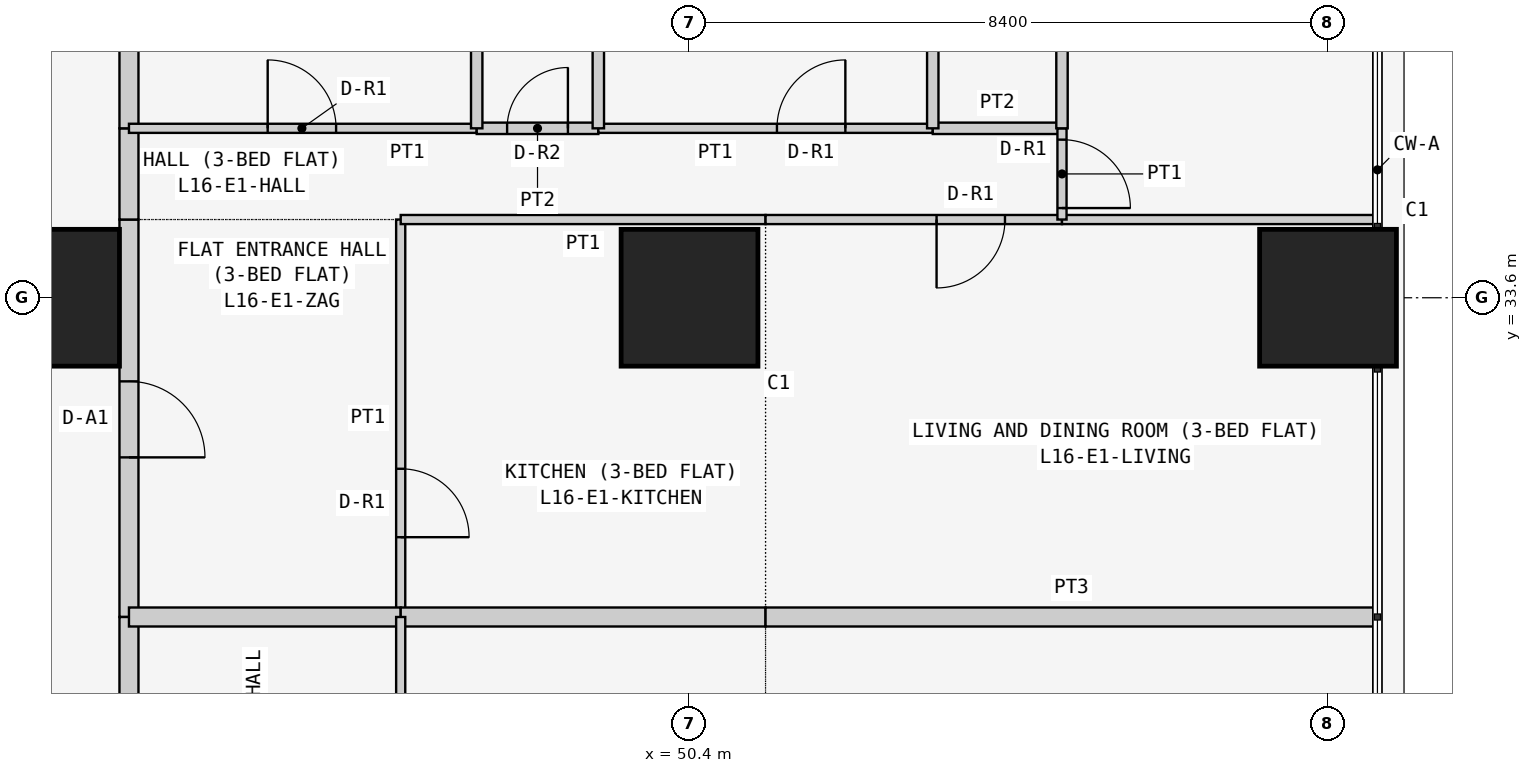
"""IFC4 building model, lengths in metres.
Left out: names, types, materials, properties, quantities, classifications, styles, units other than length and angle.
Written with IfcOpenShell. Run it as: python <this file> out.ifc"""

import sys

from ifc_helpers import new_model, si_unit, direction, frame, frame_2d, origin, origin_2d, place, context, subcontext, project, spatial, rectangle, extrude, element, fill, save


model = new_model("IFC4")
c1 = context("Model", 3, precision=1e-05, world=origin(), true_north=direction((0.0, 1.0)))
c2 = subcontext(c1, "Body", "Model", "MODEL_VIEW")
j1 = project(units=[si_unit("LENGTHUNIT", "METRE"), si_unit("PLANEANGLEUNIT", "RADIAN")], contexts=[c1])
p1 = place(None, origin())
s1 = spatial("IfcSite", under=j1, at=p1, CompositionType="ELEMENT")
p2 = place(p1, origin())
s2 = spatial("IfcBuilding", under=s1, at=p2, CompositionType="ELEMENT")
p3 = place(p2, frame((0.0, 0.0, 66.9)))
s3 = spatial("IfcBuildingStorey", under=s2, at=p3, CompositionType="ELEMENT", Elevation=66.9)
for number, where, z_axis, x_axis in (
    (1, (42.0, 33.6, 0.0), (0.0, 0.0, 1.0), (1.0, 0.0, 0.0)),
    (2, (50.4, 33.6, 0.0), (0.0, 0.0, 1.0), (1.0, 0.0, 0.0)),
    (3, (58.8, 33.6, 0.0), (0.0, 0.0, 1.0), (1.0, 0.0, 0.0)),
):
    element("IfcColumn", number, at=place(p3, frame(where, z_axis=z_axis, x_axis=x_axis)), inside=s3, PredefinedType="COLUMN", context=c2, shape_type="SweptSolid", body=[
        extrude(rectangle(XDim=1.8, YDim=1.8, at=origin_2d()), origin(), (0.0, 0.0, 1.0), 3.6),
    ])
p4 = place(p3, frame((43.025, 34.629, 0.0), z_axis=(0.0, 0.0, 1.0), x_axis=(0.0, -1.0, 0.0)))
e4 = element("IfcWall", 4, at=p4, inside=s3, PredefinedType="PARTITIONING", context=c2, shape_type="SweptSolid", body=[
    extrude(rectangle(XDim=5.229, YDim=0.25, at=frame_2d((2.615, 0.0))), origin(), (0.0, 0.0, 1.0), 3.45),
])
p5 = place(p4, frame((2.129, 0.0, 0.0)))
e5 = element("IfcOpeningElement", 5, at=p5, cuts=e4, PredefinedType="OPENING", context=c2, shape_type="SweptSolid", body=[
    extrude(rectangle(XDim=1.0, YDim=2.1, at=frame_2d((0.5, 1.05))), frame((0.0, 0.135, 0.0), z_axis=(0.0, -1.0, 0.0), x_axis=(1.0, 0.0, 0.0)), (0.0, 0.0, 1.0), 0.27),
])
p6 = place(p3, frame((43.025, 35.829, 0.0), z_axis=(0.0, 0.0, 1.0), x_axis=(0.0, -1.0, 0.0)))
e6 = element("IfcWall", 6, at=p6, inside=s3, PredefinedType="PARTITIONING", context=c2, shape_type="SweptSolid", body=[
    extrude(rectangle(XDim=1.2, YDim=0.25, at=frame_2d((0.6, 0.0))), origin(), (0.0, 0.0, 1.0), 3.45),
])
p7 = place(p3, frame((43.025, 42.7, 0.0), z_axis=(0.0, 0.0, 1.0), x_axis=(0.0, -1.0, 0.0)))
e7 = element("IfcWall", 7, at=p7, inside=s3, PredefinedType="PARTITIONING", context=c2, shape_type="SweptSolid", body=[
    extrude(rectangle(XDim=6.871, YDim=0.25, at=frame_2d((3.436, 0.0))), origin(), (0.0, 0.0, 1.0), 3.45),
])
p8 = place(p3, frame((43.025, 29.4, 0.0), z_axis=(0.0, 0.0, 1.0), x_axis=(0.0, -1.0, 0.0)))
e8 = element("IfcWall", 8, at=p8, inside=s3, PredefinedType="PARTITIONING", context=c2, shape_type="SweptSolid", body=[
    extrude(rectangle(XDim=5.229, YDim=0.25, at=frame_2d((2.615, 0.0))), origin(), (0.0, 0.0, 1.0), 3.45),
])
p9 = place(p8, frame((2.1, 0.0, 0.0)))
e9 = element("IfcOpeningElement", 9, at=p9, cuts=e8, PredefinedType="OPENING", context=c2, shape_type="SweptSolid", body=[
    extrude(rectangle(XDim=1.0, YDim=2.1, at=frame_2d((0.5, 1.05))), frame((0.0, 0.135, 0.0), z_axis=(0.0, -1.0, 0.0), x_axis=(1.0, 0.0, 0.0)), (0.0, 0.0, 1.0), 0.27),
])
p10 = place(p3, frame((46.6, 29.4, 0.0), z_axis=(0.0, 0.0, 1.0), x_axis=(0.0, 1.0, 0.0)))
e10 = element("IfcWall", 10, at=p10, inside=s3, PredefinedType="PARTITIONING", context=c2, shape_type="SweptSolid", body=[
    extrude(rectangle(XDim=5.229, YDim=0.12, at=frame_2d((2.615, 0.0))), origin(), (0.0, 0.0, 1.0), 3.45),
])
p11 = place(p10, frame((1.05, 0.0, 0.0)))
e11 = element("IfcOpeningElement", 11, at=p11, cuts=e10, PredefinedType="OPENING", context=c2, shape_type="SweptSolid", body=[
    extrude(rectangle(XDim=0.9, YDim=2.1, at=frame_2d((0.45, 1.05))), frame((0.0, 0.07, 0.0), z_axis=(0.0, -1.0, 0.0), x_axis=(1.0, 0.0, 0.0)), (0.0, 0.0, 1.0), 0.14),
])
p12 = place(p3, frame((43.025, 29.4, 0.0), z_axis=(0.0, 0.0, 1.0), x_axis=(1.0, 0.0, 0.0)))
e12 = element("IfcWall", 12, at=p12, inside=s3, PredefinedType="PARTITIONING", context=c2, shape_type="SweptSolid", body=[
    extrude(rectangle(XDim=3.575, YDim=0.25, at=frame_2d((1.788, 0.0))), origin(), (0.0, 0.0, 1.0), 3.45),
])
p13 = place(p3, frame((51.4, 34.629, 0.0), z_axis=(0.0, 0.0, 1.0), x_axis=(-1.0, 0.0, 0.0)))
e13 = element("IfcWall", 13, at=p13, inside=s3, PredefinedType="PARTITIONING", context=c2, shape_type="SweptSolid", body=[
    extrude(rectangle(XDim=4.8, YDim=0.12, at=frame_2d((2.4, 0.0))), origin(), (0.0, 0.0, 1.0), 3.45),
])
p14 = place(p3, frame((46.6, 29.4, 0.0), z_axis=(0.0, 0.0, 1.0), x_axis=(1.0, 0.0, 0.0)))
e14 = element("IfcWall", 14, at=p14, inside=s3, PredefinedType="PARTITIONING", context=c2, shape_type="SweptSolid", body=[
    extrude(rectangle(XDim=4.8, YDim=0.25, at=frame_2d((2.4, 0.0))), origin(), (0.0, 0.0, 1.0), 3.45),
])
p15 = place(p3, frame((55.3, 34.629, 0.0), z_axis=(0.0, 0.0, 1.0), x_axis=(-1.0, 0.0, 0.0)))
e15 = element("IfcWall", 15, at=p15, inside=s3, PredefinedType="PARTITIONING", context=c2, shape_type="SweptSolid", body=[
    extrude(rectangle(XDim=3.9, YDim=0.12, at=frame_2d((1.95, 0.0))), origin(), (0.0, 0.0, 1.0), 3.45),
])
p16 = place(p15, frame((0.75, 0.0, 0.0)))
e16 = element("IfcOpeningElement", 16, at=p16, cuts=e15, PredefinedType="OPENING", context=c2, shape_type="SweptSolid", body=[
    extrude(rectangle(XDim=0.9, YDim=2.1, at=frame_2d((0.45, 1.05))), frame((0.0, 0.07, 0.0), z_axis=(0.0, -1.0, 0.0), x_axis=(1.0, 0.0, 0.0)), (0.0, 0.0, 1.0), 0.14),
])
p17 = place(p3, frame((59.45, 34.629, 0.0), z_axis=(0.0, 0.0, 1.0), x_axis=(-1.0, 0.0, 0.0)))
e17 = element("IfcWall", 17, at=p17, inside=s3, PredefinedType="PARTITIONING", context=c2, shape_type="SweptSolid", body=[
    extrude(rectangle(XDim=4.15, YDim=0.12, at=frame_2d((2.075, 0.0))), origin(), (0.0, 0.0, 1.0), 3.45),
])
p18 = place(p3, frame((51.4, 29.4, 0.0), z_axis=(0.0, 0.0, 1.0), x_axis=(1.0, 0.0, 0.0)))
e18 = element("IfcWall", 18, at=p18, inside=s3, PredefinedType="PARTITIONING", context=c2, shape_type="SweptSolid", body=[
    extrude(rectangle(XDim=8.05, YDim=0.25, at=frame_2d((4.025, 0.0))), origin(), (0.0, 0.0, 1.0), 3.45),
])
p19 = place(p3, frame((47.6, 35.829, 0.0), z_axis=(0.0, 0.0, 1.0), x_axis=(-1.0, 0.0, 0.0)))
e19 = element("IfcWall", 19, at=p19, inside=s3, PredefinedType="PARTITIONING", context=c2, shape_type="SweptSolid", body=[
    extrude(rectangle(XDim=4.575, YDim=0.12, at=frame_2d((2.288, 0.0))), origin(), (0.0, 0.0, 1.0), 3.45),
])
p20 = place(p19, frame((1.85, 0.0, 0.0)))
e20 = element("IfcOpeningElement", 20, at=p20, cuts=e19, PredefinedType="OPENING", context=c2, shape_type="SweptSolid", body=[
    extrude(rectangle(XDim=0.9, YDim=2.1, at=frame_2d((0.45, 1.05))), frame((0.0, 0.07, 0.0), z_axis=(0.0, -1.0, 0.0), x_axis=(1.0, 0.0, 0.0)), (0.0, 0.0, 1.0), 0.14),
])
p21 = place(p3, frame((49.2, 35.829, 0.0), z_axis=(0.0, 0.0, 1.0), x_axis=(-1.0, 0.0, 0.0)))
e21 = element("IfcWall", 21, at=p21, inside=s3, PredefinedType="PARTITIONING", context=c2, shape_type="SweptSolid", body=[
    extrude(rectangle(XDim=1.6, YDim=0.15, at=frame_2d((0.8, 0.0))), origin(), (0.0, 0.0, 1.0), 3.45),
])
p22 = place(p21, frame((0.4, 0.0, 0.0)))
e22 = element("IfcOpeningElement", 22, at=p22, cuts=e21, PredefinedType="OPENING", context=c2, shape_type="SweptSolid", body=[
    extrude(rectangle(XDim=0.8, YDim=2.1, at=frame_2d((0.4, 1.05))), frame((0.0, 0.085, 0.0), z_axis=(0.0, -1.0, 0.0), x_axis=(1.0, 0.0, 0.0)), (0.0, 0.0, 1.0), 0.17),
])
p23 = place(p3, frame((53.6, 35.829, 0.0), z_axis=(0.0, 0.0, 1.0), x_axis=(-1.0, 0.0, 0.0)))
e23 = element("IfcWall", 23, at=p23, inside=s3, PredefinedType="PARTITIONING", context=c2, shape_type="SweptSolid", body=[
    extrude(rectangle(XDim=4.4, YDim=0.12, at=frame_2d((2.2, 0.0))), origin(), (0.0, 0.0, 1.0), 3.45),
])
p24 = place(p23, frame((1.15, 0.0, 0.0)))
e24 = element("IfcOpeningElement", 24, at=p24, cuts=e23, PredefinedType="OPENING", context=c2, shape_type="SweptSolid", body=[
    extrude(rectangle(XDim=0.9, YDim=2.1, at=frame_2d((0.45, 1.05))), frame((0.0, 0.07, 0.0), z_axis=(0.0, -1.0, 0.0), x_axis=(1.0, 0.0, 0.0)), (0.0, 0.0, 1.0), 0.14),
])
p25 = place(p3, frame((55.3, 35.829, 0.0), z_axis=(0.0, 0.0, 1.0), x_axis=(-1.0, 0.0, 0.0)))
e25 = element("IfcWall", 25, at=p25, inside=s3, PredefinedType="PARTITIONING", context=c2, shape_type="SweptSolid", body=[
    extrude(rectangle(XDim=1.7, YDim=0.15, at=frame_2d((0.85, 0.0))), origin(), (0.0, 0.0, 1.0), 3.45),
])
p26 = place(p3, frame((55.3, 34.629, 0.0), z_axis=(0.0, 0.0, 1.0), x_axis=(0.0, 1.0, 0.0)))
e26 = element("IfcWall", 26, at=p26, inside=s3, PredefinedType="PARTITIONING", context=c2, shape_type="SweptSolid", body=[
    extrude(rectangle(XDim=1.2, YDim=0.12, at=frame_2d((0.6, 0.0))), origin(), (0.0, 0.0, 1.0), 3.45),
])
p27 = place(p26, frame((0.151, 0.0, 0.0)))
e27 = element("IfcOpeningElement", 27, at=p27, cuts=e26, PredefinedType="OPENING", context=c2, shape_type="SweptSolid", body=[
    extrude(rectangle(XDim=0.9, YDim=2.1, at=frame_2d((0.45, 1.05))), frame((0.0, 0.07, 0.0), z_axis=(0.0, -1.0, 0.0), x_axis=(1.0, 0.0, 0.0)), (0.0, 0.0, 1.0), 0.14),
])
for number, where, z_axis, x_axis in (
    (28, (47.6, 35.829, 0.0), (0.0, 0.0, 1.0), (0.0, 1.0, 0.0)),
    (29, (49.2, 35.829, 0.0), (0.0, 0.0, 1.0), (0.0, 1.0, 0.0)),
    (30, (53.6, 35.829, 0.0), (0.0, 0.0, 1.0), (0.0, 1.0, 0.0)),
):
    element("IfcWall", number, at=place(p3, frame(where, z_axis=z_axis, x_axis=x_axis)), inside=s3, PredefinedType="PARTITIONING", context=c2, shape_type="SweptSolid", body=[
        extrude(rectangle(XDim=6.871, YDim=0.15, at=frame_2d((3.436, 0.0))), origin(), (0.0, 0.0, 1.0), 3.45),
    ])
p28 = place(p3, frame((55.3, 35.829, 0.0), z_axis=(0.0, 0.0, 1.0), x_axis=(0.0, 1.0, 0.0)))
e31 = element("IfcWall", 31, at=p28, inside=s3, PredefinedType="PARTITIONING", context=c2, shape_type="SweptSolid", body=[
    extrude(rectangle(XDim=6.871, YDim=0.15, at=frame_2d((3.436, 0.0))), origin(), (0.0, 0.0, 1.0), 3.45),
])
p29 = place(p28, frame((3.171, 0.0, 0.0)))
e32 = element("IfcOpeningElement", 32, at=p29, cuts=e31, PredefinedType="OPENING", context=c2, shape_type="SweptSolid", body=[
    extrude(rectangle(XDim=0.8, YDim=2.1, at=frame_2d((0.4, 1.05))), frame((0.0, 0.085, 0.0), z_axis=(0.0, -1.0, 0.0), x_axis=(1.0, 0.0, 0.0)), (0.0, 0.0, 1.0), 0.17),
])
p30 = place(p3, frame((46.6, 29.4, 0.0), z_axis=(0.0, 0.0, 1.0), x_axis=(0.0, -1.0, 0.0)))
e33 = element("IfcWall", 33, at=p30, inside=s3, PredefinedType="PARTITIONING", context=c2, shape_type="SweptSolid", body=[
    extrude(rectangle(XDim=5.229, YDim=0.12, at=frame_2d((2.615, 0.0))), origin(), (0.0, 0.0, 1.0), 3.45),
])
p31 = place(p30, frame((1.05, 0.0, 0.0)))
e34 = element("IfcOpeningElement", 34, at=p31, cuts=e33, PredefinedType="OPENING", context=c2, shape_type="SweptSolid", body=[
    extrude(rectangle(XDim=0.9, YDim=2.1, at=frame_2d((0.45, 1.05))), frame((0.0, 0.07, 0.0), z_axis=(0.0, -1.0, 0.0), x_axis=(1.0, 0.0, 0.0)), (0.0, 0.0, 1.0), 0.14),
])
p32 = place(p5, origin())
e35 = element("IfcDoor", 35, at=p32, inside=s3, OperationType="SINGLE_SWING_RIGHT", PredefinedType="DOOR", context=c2, shape_type="SweptSolid", body=[
    extrude(rectangle(XDim=1.0, YDim=2.1, at=frame_2d((0.5, 1.05))), frame((0.0, 0.025, 0.0), z_axis=(0.0, -1.0, 0.0), x_axis=(1.0, 0.0, 0.0)), (0.0, 0.0, 1.0), 0.05),
])
fill(e5, e35)
p33 = place(p11, frame((0.9, 0.0, 0.0), z_axis=(0.0, 0.0, 1.0), x_axis=(-1.0, 0.0, 0.0)))
e36 = element("IfcDoor", 36, at=p33, inside=s3, OperationType="SINGLE_SWING_RIGHT", PredefinedType="DOOR", context=c2, shape_type="SweptSolid", body=[
    extrude(rectangle(XDim=0.9, YDim=2.1, at=frame_2d((0.45, 1.05))), frame((0.0, 0.025, 0.0), z_axis=(0.0, -1.0, 0.0), x_axis=(1.0, 0.0, 0.0)), (0.0, 0.0, 1.0), 0.05),
])
fill(e11, e36)
p34 = place(p16, origin())
e37 = element("IfcDoor", 37, at=p34, inside=s3, OperationType="SINGLE_SWING_RIGHT", PredefinedType="DOOR", context=c2, shape_type="SweptSolid", body=[
    extrude(rectangle(XDim=0.9, YDim=2.1, at=frame_2d((0.45, 1.05))), frame((0.0, 0.025, 0.0), z_axis=(0.0, -1.0, 0.0), x_axis=(1.0, 0.0, 0.0)), (0.0, 0.0, 1.0), 0.05),
])
fill(e16, e37)
p35 = place(p20, frame((0.9, 0.0, 0.0), z_axis=(0.0, 0.0, 1.0), x_axis=(-1.0, 0.0, 0.0)))
e38 = element("IfcDoor", 38, at=p35, inside=s3, OperationType="SINGLE_SWING_LEFT", PredefinedType="DOOR", context=c2, shape_type="SweptSolid", body=[
    extrude(rectangle(XDim=0.9, YDim=2.1, at=frame_2d((0.45, 1.05))), frame((0.0, 0.025, 0.0), z_axis=(0.0, -1.0, 0.0), x_axis=(1.0, 0.0, 0.0)), (0.0, 0.0, 1.0), 0.05),
])
fill(e20, e38)
p36 = place(p22, frame((0.8, 0.0, 0.0), z_axis=(0.0, 0.0, 1.0), x_axis=(-1.0, 0.0, 0.0)))
e39 = element("IfcDoor", 39, at=p36, inside=s3, OperationType="SINGLE_SWING_RIGHT", PredefinedType="DOOR", context=c2, shape_type="SweptSolid", body=[
    extrude(rectangle(XDim=0.8, YDim=2.1, at=frame_2d((0.4, 1.05))), frame((0.0, 0.025, 0.0), z_axis=(0.0, -1.0, 0.0), x_axis=(1.0, 0.0, 0.0)), (0.0, 0.0, 1.0), 0.05),
])
fill(e22, e39)
p37 = place(p24, frame((0.9, 0.0, 0.0), z_axis=(0.0, 0.0, 1.0), x_axis=(-1.0, 0.0, 0.0)))
e40 = element("IfcDoor", 40, at=p37, inside=s3, OperationType="SINGLE_SWING_RIGHT", PredefinedType="DOOR", context=c2, shape_type="SweptSolid", body=[
    extrude(rectangle(XDim=0.9, YDim=2.1, at=frame_2d((0.45, 1.05))), frame((0.0, 0.025, 0.0), z_axis=(0.0, -1.0, 0.0), x_axis=(1.0, 0.0, 0.0)), (0.0, 0.0, 1.0), 0.05),
])
fill(e24, e40)
p38 = place(p27, frame((0.9, 0.0, 0.0), z_axis=(0.0, 0.0, 1.0), x_axis=(-1.0, 0.0, 0.0)))
e41 = element("IfcDoor", 41, at=p38, inside=s3, OperationType="SINGLE_SWING_RIGHT", PredefinedType="DOOR", context=c2, shape_type="SweptSolid", body=[
    extrude(rectangle(XDim=0.9, YDim=2.1, at=frame_2d((0.45, 1.05))), frame((0.0, 0.025, 0.0), z_axis=(0.0, -1.0, 0.0), x_axis=(1.0, 0.0, 0.0)), (0.0, 0.0, 1.0), 0.05),
])
fill(e27, e41)
save(model, sys.argv[1])
